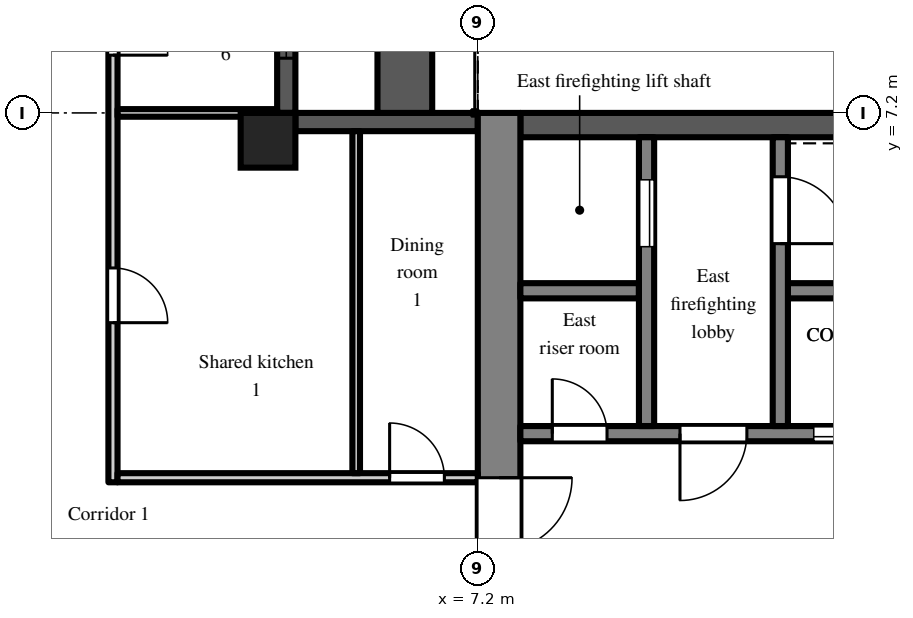
"""IFC4 building model, lengths in metres.
Left out: names, types, materials, properties, quantities, classifications, styles, units other than length and angle.
Written with IfcOpenShell. Run it as: python <this file> out.ifc"""

import sys

from ifc_helpers import new_model, si_unit, direction, frame, frame_2d, origin, origin_2d, place, context, subcontext, project, spatial, rectangle, extrude, element, fill, save


model = new_model("IFC4")
c1 = context("Model", 3, precision=1e-05, world=origin(), true_north=direction((0.0, 1.0)))
c2 = subcontext(c1, "Body", "Model", "MODEL_VIEW")
j1 = project(units=[si_unit("LENGTHUNIT", "METRE"), si_unit("PLANEANGLEUNIT", "RADIAN")], contexts=[c1])
p1 = place(None, origin())
s1 = spatial("IfcSite", under=j1, at=p1, CompositionType="ELEMENT")
p2 = place(p1, origin())
s2 = spatial("IfcBuilding", under=s1, at=p2, CompositionType="ELEMENT")
p3 = place(p2, frame((0.0, 0.0, 231.9)))
s3 = spatial("IfcBuildingStorey", under=s2, at=p3, CompositionType="ELEMENT", Elevation=231.9)
p4 = place(p3, frame((3.75, 6.75, 0.0), z_axis=(0.0, 0.0, 1.0), x_axis=(1.0, 0.0, 0.0)))
e1 = element("IfcColumn", 1, at=p4, inside=s3, PredefinedType="COLUMN", context=c2, shape_type="SweptSolid", body=[
    extrude(rectangle(XDim=0.9, YDim=0.9, at=origin_2d()), origin(), (0.0, 0.0, 1.0), 3.0),
])
p5 = place(p3, frame((7.2, 7.05, 0.0), z_axis=(0.0, 0.0, 1.0), x_axis=(-1.0, 0.0, 0.0)))
e2 = element("IfcWall", 2, at=p5, inside=s3, PredefinedType="SOLIDWALL", context=c2, shape_type="SweptSolid", body=[
    extrude(rectangle(XDim=3.0, YDim=0.3, at=frame_2d((1.5, 0.0))), origin(), (0.0, 0.0, 1.0), 2.3),
])
p6 = place(p3, frame((4.05, 7.2, 0.0), z_axis=(0.0, 0.0, 1.0), x_axis=(0.0, 1.0, 0.0)))
e3 = element("IfcWall", 3, at=p6, inside=s3, PredefinedType="SOLIDWALL", context=c2, shape_type="SweptSolid", body=[
    extrude(rectangle(XDim=7.2, YDim=0.3, at=frame_2d((3.6, 0.0))), origin(), (0.0, 0.0, 1.0), 2.3),
])
p7 = place(p6, frame((3.0, 0.0, 0.0)))
e4 = element("IfcOpeningElement", 4, at=p7, cuts=e3, PredefinedType="OPENING", context=c2, shape_type="SweptSolid", body=[
    extrude(rectangle(XDim=1.2, YDim=2.05, at=frame_2d((0.6, 1.025))), frame((0.0, 0.16, 0.0), z_axis=(0.0, -1.0, 0.0), x_axis=(1.0, 0.0, 0.0)), (0.0, 0.0, 1.0), 0.32),
])
p8 = place(p6, frame((0.9, 0.0, 0.2)))
e5 = element("IfcOpeningElement", 5, at=p8, cuts=e3, PredefinedType="OPENING", context=c2, shape_type="SweptSolid", body=[
    extrude(rectangle(XDim=1.8, YDim=1.85, at=frame_2d((0.9, 0.925))), frame((0.0, 0.16, 0.0), z_axis=(0.0, -1.0, 0.0), x_axis=(1.0, 0.0, 0.0)), (0.0, 0.0, 1.0), 0.32),
])
p9 = place(p6, frame((4.5, 0.0, 0.2)))
e6 = element("IfcOpeningElement", 6, at=p9, cuts=e3, PredefinedType="OPENING", context=c2, shape_type="SweptSolid", body=[
    extrude(rectangle(XDim=1.8, YDim=1.85, at=frame_2d((0.9, 0.925))), frame((0.0, 0.16, 0.0), z_axis=(0.0, -1.0, 0.0), x_axis=(1.0, 0.0, 0.0)), (0.0, 0.0, 1.0), 0.32),
])
p10 = place(p3, frame((6.0, 7.2, 0.0), z_axis=(0.0, 0.0, 1.0), x_axis=(0.0, 1.0, 0.0)))
e7 = element("IfcWall", 7, at=p10, inside=s3, PredefinedType="PARAPET", context=c2, shape_type="SweptSolid", body=[
    extrude(rectangle(XDim=7.2, YDim=0.9, at=frame_2d((3.6, 0.0))), origin(), (0.0, 0.0, 1.0), 0.8),
])
p11 = place(p3, frame((7.55, -7.2, 0.0), z_axis=(0.0, 0.0, 1.0), x_axis=(0.0, 1.0, 0.0)))
e8 = element("IfcWall", 8, at=p11, inside=s3, PredefinedType="SHEAR", context=c2, shape_type="SweptSolid", body=[
    extrude(rectangle(XDim=14.4, YDim=0.7, at=frame_2d((7.2, 0.0))), origin(), (0.0, 0.0, 1.0), 2.6),
])
p12 = place(p11, frame((6.0, 0.0, 0.0)))
e9 = element("IfcOpeningElement", 9, at=p12, cuts=e8, PredefinedType="OPENING", context=c2, shape_type="SweptSolid", body=[
    extrude(rectangle(XDim=2.4, YDim=2.2, at=frame_2d((1.2, 1.1))), frame((0.0, 0.36, 0.0), z_axis=(0.0, -1.0, 0.0), x_axis=(1.0, 0.0, 0.0)), (0.0, 0.0, 1.0), 0.72),
])
p13 = place(p3, frame((7.9, 7.0, 0.0), z_axis=(0.0, 0.0, 1.0), x_axis=(1.0, 0.0, 0.0)))
e10 = element("IfcWall", 10, at=p13, inside=s3, PredefinedType="SHEAR", context=c2, shape_type="SweptSolid", body=[
    extrude(rectangle(XDim=12.95, YDim=0.4, at=frame_2d((6.475, 0.0))), origin(), (0.0, 0.0, 1.0), 2.6),
])
p14 = place(p3, frame((7.9, 1.925, 0.0), z_axis=(0.0, 0.0, 1.0), x_axis=(1.0, 0.0, 0.0)))
e11 = element("IfcWall", 11, at=p14, inside=s3, PredefinedType="SHEAR", context=c2, shape_type="SweptSolid", body=[
    extrude(rectangle(XDim=12.95, YDim=0.25, at=frame_2d((6.475, 0.0))), origin(), (0.0, 0.0, 1.0), 2.6),
])
p15 = place(p14, frame((4.825, 0.0, 0.0)))
e12 = element("IfcOpeningElement", 12, at=p15, cuts=e11, PredefinedType="OPENING", context=c2, shape_type="SweptSolid", body=[
    extrude(rectangle(XDim=1.1, YDim=2.1, at=frame_2d((0.55, 1.05))), frame((0.0, 0.135, 0.0), z_axis=(0.0, -1.0, 0.0), x_axis=(1.0, 0.0, 0.0)), (0.0, 0.0, 1.0), 0.27),
])
p16 = place(p14, frame((7.025, 0.0, 0.0)))
e13 = element("IfcOpeningElement", 13, at=p16, cuts=e11, PredefinedType="OPENING", context=c2, shape_type="SweptSolid", body=[
    extrude(rectangle(XDim=1.1, YDim=2.1, at=frame_2d((0.55, 1.05))), frame((0.0, 0.135, 0.0), z_axis=(0.0, -1.0, 0.0), x_axis=(1.0, 0.0, 0.0)), (0.0, 0.0, 1.0), 0.27),
])
p17 = place(p14, frame((9.225, 0.0, 0.0)))
e14 = element("IfcOpeningElement", 14, at=p17, cuts=e11, PredefinedType="OPENING", context=c2, shape_type="SweptSolid", body=[
    extrude(rectangle(XDim=1.1, YDim=2.1, at=frame_2d((0.55, 1.05))), frame((0.0, 0.135, 0.0), z_axis=(0.0, -1.0, 0.0), x_axis=(1.0, 0.0, 0.0)), (0.0, 0.0, 1.0), 0.27),
])
p18 = place(p14, frame((0.525, 0.0, 0.0)))
e15 = element("IfcOpeningElement", 15, at=p18, cuts=e11, PredefinedType="OPENING", context=c2, shape_type="SweptSolid", body=[
    extrude(rectangle(XDim=0.9, YDim=2.1, at=frame_2d((0.45, 1.05))), frame((0.0, 0.135, 0.0), z_axis=(0.0, -1.0, 0.0), x_axis=(1.0, 0.0, 0.0)), (0.0, 0.0, 1.0), 0.27),
])
p19 = place(p14, frame((2.625, 0.0, 0.0)))
e16 = element("IfcOpeningElement", 16, at=p19, cuts=e11, PredefinedType="OPENING", context=c2, shape_type="SweptSolid", body=[
    extrude(rectangle(XDim=1.1, YDim=2.1, at=frame_2d((0.55, 1.05))), frame((0.0, 0.135, 0.0), z_axis=(0.0, -1.0, 0.0), x_axis=(1.0, 0.0, 0.0)), (0.0, 0.0, 1.0), 0.27),
])
p20 = place(p14, frame((11.525, 0.0, 0.0)))
e17 = element("IfcOpeningElement", 17, at=p20, cuts=e11, PredefinedType="OPENING", context=c2, shape_type="SweptSolid", body=[
    extrude(rectangle(XDim=0.9, YDim=2.1, at=frame_2d((0.45, 1.05))), frame((0.0, 0.135, 0.0), z_axis=(0.0, -1.0, 0.0), x_axis=(1.0, 0.0, 0.0)), (0.0, 0.0, 1.0), 0.27),
])
p21 = place(p3, frame((7.9, 4.275, 0.0), z_axis=(0.0, 0.0, 1.0), x_axis=(1.0, 0.0, 0.0)))
e18 = element("IfcWall", 18, at=p21, inside=s3, PredefinedType="SHEAR", context=c2, shape_type="SweptSolid", body=[
    extrude(rectangle(XDim=1.95, YDim=0.25, at=frame_2d((0.975, 0.0))), origin(), (0.0, 0.0, 1.0), 2.6),
])
p22 = place(p3, frame((12.3, 4.275, 0.0), z_axis=(0.0, 0.0, 1.0), x_axis=(1.0, 0.0, 0.0)))
e19 = element("IfcWall", 19, at=p22, inside=s3, PredefinedType="SHEAR", context=c2, shape_type="SweptSolid", body=[
    extrude(rectangle(XDim=8.55, YDim=0.25, at=frame_2d((4.275, 0.0))), origin(), (0.0, 0.0, 1.0), 2.6),
])
p23 = place(p3, frame((9.975, 2.05, 0.0), z_axis=(0.0, 0.0, 1.0), x_axis=(0.0, 1.0, 0.0)))
e20 = element("IfcWall", 20, at=p23, inside=s3, PredefinedType="SHEAR", context=c2, shape_type="SweptSolid", body=[
    extrude(rectangle(XDim=4.75, YDim=0.25, at=frame_2d((2.375, 0.0))), origin(), (0.0, 0.0, 1.0), 2.6),
])
p24 = place(p23, frame((2.95, 0.0, 0.0)))
e21 = element("IfcOpeningElement", 21, at=p24, cuts=e20, PredefinedType="OPENING", context=c2, shape_type="SweptSolid", body=[
    extrude(rectangle(XDim=1.1, YDim=2.1, at=frame_2d((0.55, 1.05))), frame((0.0, 0.135, 0.0), z_axis=(0.0, -1.0, 0.0), x_axis=(1.0, 0.0, 0.0)), (0.0, 0.0, 1.0), 0.27),
])
p25 = place(p3, frame((12.175, 2.05, 0.0), z_axis=(0.0, 0.0, 1.0), x_axis=(0.0, 1.0, 0.0)))
e22 = element("IfcWall", 22, at=p25, inside=s3, PredefinedType="SHEAR", context=c2, shape_type="SweptSolid", body=[
    extrude(rectangle(XDim=4.75, YDim=0.25, at=frame_2d((2.375, 0.0))), origin(), (0.0, 0.0, 1.0), 2.6),
])
p26 = place(p25, frame((3.0, 0.0, 0.0)))
e23 = element("IfcOpeningElement", 23, at=p26, cuts=e22, PredefinedType="OPENING", context=c2, shape_type="SweptSolid", body=[
    extrude(rectangle(XDim=1.1, YDim=2.1, at=frame_2d((0.55, 1.05))), frame((0.0, 0.135, 0.0), z_axis=(0.0, -1.0, 0.0), x_axis=(1.0, 0.0, 0.0)), (0.0, 0.0, 1.0), 0.27),
])
p27 = place(p3, frame((1.2, 1.125, 0.0), z_axis=(0.0, 0.0, 1.0), x_axis=(0.0, 1.0, 0.0)))
e24 = element("IfcWall", 24, at=p27, inside=s3, PredefinedType="PARTITIONING", context=c2, shape_type="SweptSolid", body=[
    extrude(rectangle(XDim=18.4, YDim=0.15, at=frame_2d((9.2, 0.0))), origin(), (0.0, 0.0, 1.0), 2.6),
])
p28 = place(p27, frame((2.625, 0.0, 0.0)))
e25 = element("IfcOpeningElement", 25, at=p28, cuts=e24, PredefinedType="OPENING", context=c2, shape_type="SweptSolid", body=[
    extrude(rectangle(XDim=0.9, YDim=2.1, at=frame_2d((0.45, 1.05))), frame((0.0, 0.085, 0.0), z_axis=(0.0, -1.0, 0.0), x_axis=(1.0, 0.0, 0.0)), (0.0, 0.0, 1.0), 0.17),
])
p29 = place(p27, frame((7.025, 0.0, 0.0)))
e26 = element("IfcOpeningElement", 26, at=p29, cuts=e24, PredefinedType="OPENING", context=c2, shape_type="SweptSolid", body=[
    extrude(rectangle(XDim=0.9, YDim=2.1, at=frame_2d((0.45, 1.05))), frame((0.0, 0.085, 0.0), z_axis=(0.0, -1.0, 0.0), x_axis=(1.0, 0.0, 0.0)), (0.0, 0.0, 1.0), 0.17),
])
p30 = place(p27, frame((10.625, 0.0, 0.0)))
e27 = element("IfcOpeningElement", 27, at=p30, cuts=e24, PredefinedType="OPENING", context=c2, shape_type="SweptSolid", body=[
    extrude(rectangle(XDim=0.9, YDim=2.1, at=frame_2d((0.45, 1.05))), frame((0.0, 0.085, 0.0), z_axis=(0.0, -1.0, 0.0), x_axis=(1.0, 0.0, 0.0)), (0.0, 0.0, 1.0), 0.17),
])
p31 = place(p27, frame((13.475, 0.0, 0.0)))
e28 = element("IfcOpeningElement", 28, at=p31, cuts=e24, PredefinedType="OPENING", context=c2, shape_type="SweptSolid", body=[
    extrude(rectangle(XDim=1.0, YDim=2.1, at=frame_2d((0.5, 1.05))), frame((0.0, 0.085, 0.0), z_axis=(0.0, -1.0, 0.0), x_axis=(1.0, 0.0, 0.0)), (0.0, 0.0, 1.0), 0.17),
])
p32 = place(p3, frame((1.275, 1.2, 0.0), z_axis=(0.0, 0.0, 1.0), x_axis=(1.0, 0.0, 0.0)))
e29 = element("IfcWall", 29, at=p32, inside=s3, PredefinedType="PARTITIONING", context=c2, shape_type="SweptSolid", body=[
    extrude(rectangle(XDim=5.925, YDim=0.15, at=frame_2d((2.962, 0.0))), origin(), (0.0, 0.0, 1.0), 2.6),
])
p33 = place(p32, frame((4.475, 0.0, 0.0)))
e30 = element("IfcOpeningElement", 30, at=p33, cuts=e29, PredefinedType="OPENING", context=c2, shape_type="SweptSolid", body=[
    extrude(rectangle(XDim=0.9, YDim=2.1, at=frame_2d((0.45, 1.05))), frame((0.0, 0.085, 0.0), z_axis=(0.0, -1.0, 0.0), x_axis=(1.0, 0.0, 0.0)), (0.0, 0.0, 1.0), 0.17),
])
p34 = place(p3, frame((1.275, 7.2, 0.0), z_axis=(0.0, 0.0, 1.0), x_axis=(1.0, 0.0, 0.0)))
e31 = element("IfcWall", 31, at=p34, inside=s3, PredefinedType="PARTITIONING", context=c2, shape_type="SweptSolid", body=[
    extrude(rectangle(XDim=2.625, YDim=0.125, at=frame_2d((1.312, 0.0))), origin(), (0.0, 0.0, 1.0), 2.6),
])
p35 = place(p3, frame((5.2, 1.275, 0.0), z_axis=(0.0, 0.0, 1.0), x_axis=(0.0, 1.0, 0.0)))
e32 = element("IfcWall", 32, at=p35, inside=s3, PredefinedType="PARTITIONING", context=c2, shape_type="SweptSolid", body=[
    extrude(rectangle(XDim=5.625, YDim=0.125, at=frame_2d((2.812, 0.0))), origin(), (0.0, 0.0, 1.0), 2.6),
])
p36 = place(p8, origin())
e33 = element("IfcWindow", 33, at=p36, inside=s3, PartitioningType="SINGLE_PANEL", PredefinedType="WINDOW", context=c2, shape_type="SweptSolid", body=[
    extrude(rectangle(XDim=1.8, YDim=1.85, at=frame_2d((0.9, 0.925))), frame((0.0, 0.03, 0.0), z_axis=(0.0, -1.0, 0.0), x_axis=(1.0, 0.0, 0.0)), (0.0, 0.0, 1.0), 0.06),
])
fill(e5, e33)
p37 = place(p15, origin())
e34 = element("IfcDoor", 34, at=p37, inside=s3, OperationType="SLIDING_TO_LEFT", PredefinedType="DOOR", context=c2, shape_type="SweptSolid", body=[
    extrude(rectangle(XDim=1.1, YDim=2.1, at=frame_2d((0.55, 1.05))), frame((0.0, 0.025, 0.0), z_axis=(0.0, -1.0, 0.0), x_axis=(1.0, 0.0, 0.0)), (0.0, 0.0, 1.0), 0.05),
])
fill(e12, e34)
p38 = place(p24, origin())
e35 = element("IfcDoor", 35, at=p38, inside=s3, OperationType="SLIDING_TO_LEFT", PredefinedType="DOOR", context=c2, shape_type="SweptSolid", body=[
    extrude(rectangle(XDim=1.1, YDim=2.1, at=frame_2d((0.55, 1.05))), frame((0.0, 0.025, 0.0), z_axis=(0.0, -1.0, 0.0), x_axis=(1.0, 0.0, 0.0)), (0.0, 0.0, 1.0), 0.05),
])
fill(e21, e35)
p39 = place(p26, frame((1.1, 0.0, 0.0), z_axis=(0.0, 0.0, 1.0), x_axis=(-1.0, 0.0, 0.0)))
e36 = element("IfcDoor", 36, at=p39, inside=s3, OperationType="SINGLE_SWING_RIGHT", PredefinedType="DOOR", context=c2, shape_type="SweptSolid", body=[
    extrude(rectangle(XDim=1.1, YDim=2.1, at=frame_2d((0.55, 1.05))), frame((0.0, 0.025, 0.0), z_axis=(0.0, -1.0, 0.0), x_axis=(1.0, 0.0, 0.0)), (0.0, 0.0, 1.0), 0.05),
])
fill(e23, e36)
p40 = place(p18, origin())
e37 = element("IfcDoor", 37, at=p40, inside=s3, OperationType="SINGLE_SWING_LEFT", PredefinedType="DOOR", context=c2, shape_type="SweptSolid", body=[
    extrude(rectangle(XDim=0.9, YDim=2.1, at=frame_2d((0.45, 1.05))), frame((0.0, 0.025, 0.0), z_axis=(0.0, -1.0, 0.0), x_axis=(1.0, 0.0, 0.0)), (0.0, 0.0, 1.0), 0.05),
])
fill(e15, e37)
p41 = place(p19, frame((1.1, 0.0, 0.0), z_axis=(0.0, 0.0, 1.0), x_axis=(-1.0, 0.0, 0.0)))
e38 = element("IfcDoor", 38, at=p41, inside=s3, OperationType="SINGLE_SWING_RIGHT", PredefinedType="DOOR", context=c2, shape_type="SweptSolid", body=[
    extrude(rectangle(XDim=1.1, YDim=2.1, at=frame_2d((0.55, 1.05))), frame((0.0, 0.025, 0.0), z_axis=(0.0, -1.0, 0.0), x_axis=(1.0, 0.0, 0.0)), (0.0, 0.0, 1.0), 0.05),
])
fill(e16, e38)
p42 = place(p12, frame((2.4, 0.0, 0.0), z_axis=(0.0, 0.0, 1.0), x_axis=(-1.0, 0.0, 0.0)))
e39 = element("IfcDoor", 39, at=p42, inside=s3, OperationType="DOUBLE_DOOR_DOUBLE_SWING", PredefinedType="DOOR", context=c2, shape_type="SweptSolid", body=[
    extrude(rectangle(XDim=2.4, YDim=2.2, at=frame_2d((1.2, 1.1))), frame((0.0, 0.025, 0.0), z_axis=(0.0, -1.0, 0.0), x_axis=(1.0, 0.0, 0.0)), (0.0, 0.0, 1.0), 0.05),
])
fill(e9, e39)
p43 = place(p28, frame((0.9, 0.0, 0.0), z_axis=(0.0, 0.0, 1.0), x_axis=(-1.0, 0.0, 0.0)))
e40 = element("IfcDoor", 40, at=p43, inside=s3, OperationType="SINGLE_SWING_RIGHT", PredefinedType="DOOR", context=c2, shape_type="SweptSolid", body=[
    extrude(rectangle(XDim=0.9, YDim=2.1, at=frame_2d((0.45, 1.05))), frame((0.0, 0.025, 0.0), z_axis=(0.0, -1.0, 0.0), x_axis=(1.0, 0.0, 0.0)), (0.0, 0.0, 1.0), 0.05),
])
fill(e25, e40)
p44 = place(p33, origin())
e41 = element("IfcDoor", 41, at=p44, inside=s3, OperationType="SINGLE_SWING_LEFT", PredefinedType="DOOR", context=c2, shape_type="SweptSolid", body=[
    extrude(rectangle(XDim=0.9, YDim=2.1, at=frame_2d((0.45, 1.05))), frame((0.0, 0.025, 0.0), z_axis=(0.0, -1.0, 0.0), x_axis=(1.0, 0.0, 0.0)), (0.0, 0.0, 1.0), 0.05),
])
fill(e30, e41)
p45 = place(p29, frame((0.9, 0.0, 0.0), z_axis=(0.0, 0.0, 1.0), x_axis=(-1.0, 0.0, 0.0)))
e42 = element("IfcDoor", 42, at=p45, inside=s3, OperationType="SINGLE_SWING_RIGHT", PredefinedType="DOOR", context=c2, shape_type="SweptSolid", body=[
    extrude(rectangle(XDim=0.9, YDim=2.1, at=frame_2d((0.45, 1.05))), frame((0.0, 0.025, 0.0), z_axis=(0.0, -1.0, 0.0), x_axis=(1.0, 0.0, 0.0)), (0.0, 0.0, 1.0), 0.05),
])
fill(e26, e42)
save(model, sys.argv[1])
